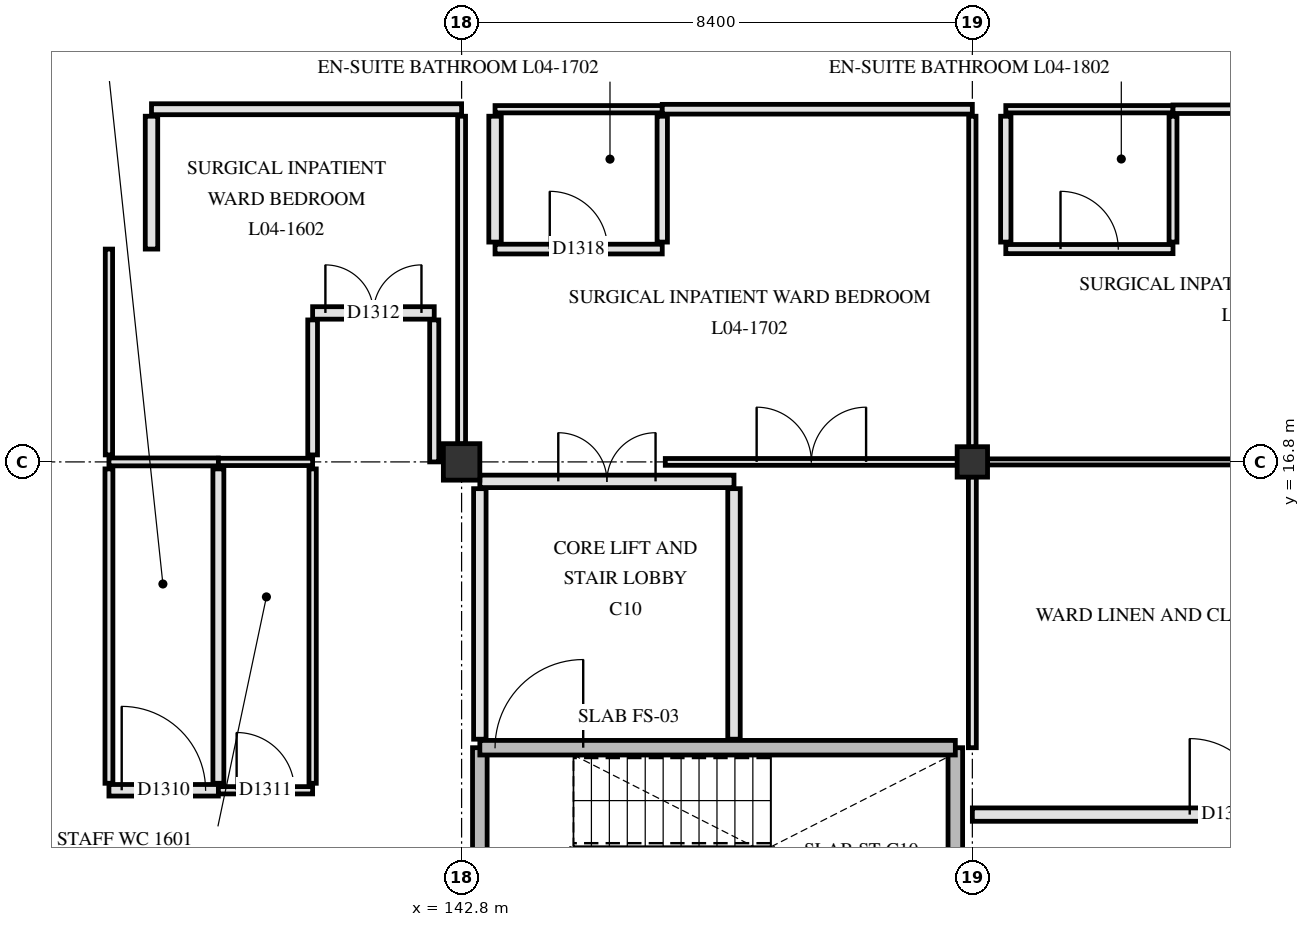
"""IFC4 building model, lengths in metres.
Left out: names, types, materials, properties, quantities, classifications, styles, units other than length and angle.
Written with IfcOpenShell. Run it as: python <this file> out.ifc"""

import sys

from ifc_helpers import new_model, si_unit, direction, frame, frame_2d, origin, origin_2d, place, context, subcontext, project, spatial, rectangle, extrude, element, fill, save


model = new_model("IFC4")
c1 = context("Model", 3, precision=1e-05, world=origin(), true_north=direction((0.0, 1.0)))
c2 = subcontext(c1, "Body", "Model", "MODEL_VIEW")
j1 = project(units=[si_unit("LENGTHUNIT", "METRE"), si_unit("PLANEANGLEUNIT", "RADIAN")], contexts=[c1])
p1 = place(None, origin())
s1 = spatial("IfcSite", under=j1, at=p1, CompositionType="ELEMENT")
p2 = place(p1, origin())
s2 = spatial("IfcBuilding", under=s1, at=p2, CompositionType="ELEMENT")
p3 = place(p2, frame((0.0, 0.0, 18.6)))
s3 = spatial("IfcBuildingStorey", under=s2, at=p3, CompositionType="ELEMENT", Elevation=18.6)
p4 = place(p3, frame((142.8, 16.8, 0.0), z_axis=(0.0, 0.0, 1.0), x_axis=(1.0, 0.0, 0.0)))
e1 = element("IfcColumn", 1, at=p4, inside=s3, PredefinedType="COLUMN", context=c2, shape_type="SweptSolid", body=[
    extrude(rectangle(XDim=0.6, YDim=0.6, at=origin_2d()), origin(), (0.0, 0.0, 1.0), 3.9),
])
p5 = place(p3, frame((151.2, 16.8, 0.0), z_axis=(0.0, 0.0, 1.0), x_axis=(1.0, 0.0, 0.0)))
e2 = element("IfcColumn", 2, at=p5, inside=s3, PredefinedType="COLUMN", context=c2, shape_type="SweptSolid", body=[
    extrude(rectangle(XDim=0.5, YDim=0.5, at=origin_2d()), origin(), (0.0, 0.0, 1.0), 3.9),
])
for number, where, z_axis, x_axis in (
    (3, (143.1, 8.78, 0.0), (0.0, 0.0, 1.0), (0.0, 1.0, 0.0)),
    (4, (150.92, 8.78, 0.0), (0.0, 0.0, 1.0), (0.0, 1.0, 0.0)),
):
    element("IfcWall", number, at=place(p3, frame(where, z_axis=z_axis, x_axis=x_axis)), inside=s3, PredefinedType="SHEAR", context=c2, shape_type="SweptSolid", body=[
        extrude(rectangle(XDim=3.32, YDim=0.24, at=frame_2d((1.66, 0.0))), origin(), (0.0, 0.0, 1.0), 3.62),
    ])
p6 = place(p3, frame((143.1, 12.1, 0.0), z_axis=(0.0, 0.0, 1.0), x_axis=(1.0, 0.0, 0.0)))
e5 = element("IfcWall", 5, at=p6, inside=s3, PredefinedType="SHEAR", context=c2, shape_type="SweptSolid", body=[
    extrude(rectangle(XDim=7.82, YDim=0.24, at=frame_2d((3.91, 0.0))), origin(), (0.0, 0.0, 1.0), 3.62),
])
p7 = place(p6, frame((0.25, 0.0, 0.0)))
e6 = element("IfcOpeningElement", 6, at=p7, cuts=e5, PredefinedType="OPENING", context=c2, shape_type="SweptSolid", body=[
    extrude(rectangle(XDim=1.45, YDim=2.2, at=frame_2d((0.725, 1.1))), frame((0.0, 0.13, 0.0), z_axis=(0.0, -1.0, 0.0), x_axis=(1.0, 0.0, 0.0)), (0.0, 0.0, 1.0), 0.26),
])
for number, where, z_axis, x_axis in (
    (7, (147.28, 12.24, 0.0), (0.0, 0.0, 1.0), (0.0, 1.0, 0.0)),
    (8, (143.1, 12.24, 0.0), (0.0, 0.0, 1.0), (0.0, 1.0, 0.0)),
):
    element("IfcWall", number, at=place(p3, frame(where, z_axis=z_axis, x_axis=x_axis)), inside=s3, PredefinedType="PARTITIONING", context=c2, shape_type="SweptSolid", body=[
        extrude(rectangle(XDim=4.12, YDim=0.205, at=frame_2d((2.06, 0.0))), origin(), (0.0, 0.0, 1.0), 3.61),
    ])
p8 = place(p3, frame((143.1, 16.48, 0.0), z_axis=(0.0, 0.0, 1.0), x_axis=(1.0, 0.0, 0.0)))
e9 = element("IfcWall", 9, at=p8, inside=s3, PredefinedType="PARTITIONING", context=c2, shape_type="SweptSolid", body=[
    extrude(rectangle(XDim=4.18, YDim=0.205, at=frame_2d((2.09, 0.0))), origin(), (0.0, 0.0, 1.0), 3.61),
])
p9 = place(p8, frame((1.29, 0.0, 0.0)))
e10 = element("IfcOpeningElement", 10, at=p9, cuts=e9, PredefinedType="OPENING", context=c2, shape_type="SweptSolid", body=[
    extrude(rectangle(XDim=1.6, YDim=2.25, at=frame_2d((0.8, 1.125))), frame((0.0, 0.113, 0.0), z_axis=(0.0, -1.0, 0.0), x_axis=(1.0, 0.0, 0.0)), (0.0, 0.0, 1.0), 0.225),
])
p10 = place(p3, frame((151.2, 11.0, 0.0), z_axis=(0.0, 0.0, 1.0), x_axis=(1.0, 0.0, 0.0)))
e11 = element("IfcWall", 11, at=p10, inside=s3, PredefinedType="PARTITIONING", context=c2, shape_type="SweptSolid", body=[
    extrude(rectangle(XDim=8.4, YDim=0.22, at=frame_2d((4.2, 0.0))), origin(), (0.0, 0.0, 1.0), 3.25),
])
p11 = place(p10, frame((3.575, 0.0, 0.0)))
e12 = element("IfcOpeningElement", 12, at=p11, cuts=e11, PredefinedType="OPENING", context=c2, shape_type="SweptSolid", body=[
    extrude(rectangle(XDim=1.25, YDim=2.2, at=frame_2d((0.625, 1.1))), frame((0.0, 0.12, 0.0), z_axis=(0.0, -1.0, 0.0), x_axis=(1.0, 0.0, 0.0)), (0.0, 0.0, 1.0), 0.24),
])
p12 = place(p3, frame((137.0, 11.4, 0.0), z_axis=(0.0, 0.0, 1.0), x_axis=(1.0, 0.0, 0.0)))
e13 = element("IfcWall", 13, at=p12, inside=s3, PredefinedType="PARTITIONING", context=c2, shape_type="SweptSolid", body=[
    extrude(rectangle(XDim=1.8, YDim=0.19, at=frame_2d((0.9, 0.0))), origin(), (0.0, 0.0, 1.0), 3.61),
])
p13 = place(p12, frame((0.21, 0.0, 0.0)))
e14 = element("IfcOpeningElement", 14, at=p13, cuts=e13, PredefinedType="OPENING", context=c2, shape_type="SweptSolid", body=[
    extrude(rectangle(XDim=1.38, YDim=2.22, at=frame_2d((0.69, 1.11))), frame((0.0, 0.105, 0.0), z_axis=(0.0, -1.0, 0.0), x_axis=(1.0, 0.0, 0.0)), (0.0, 0.0, 1.0), 0.21),
])
p14 = place(p3, frame((138.8, 11.4, 0.0), z_axis=(0.0, 0.0, 1.0), x_axis=(1.0, 0.0, 0.0)))
e15 = element("IfcWall", 15, at=p14, inside=s3, PredefinedType="PARTITIONING", context=c2, shape_type="SweptSolid", body=[
    extrude(rectangle(XDim=1.55, YDim=0.12, at=frame_2d((0.775, 0.0))), origin(), (0.0, 0.0, 1.0), 3.61),
])
p15 = place(p14, frame((0.3, 0.0, 0.0)))
e16 = element("IfcOpeningElement", 16, at=p15, cuts=e15, PredefinedType="OPENING", context=c2, shape_type="SweptSolid", body=[
    extrude(rectangle(XDim=0.95, YDim=2.1, at=frame_2d((0.475, 1.05))), frame((0.0, 0.07, 0.0), z_axis=(0.0, -1.0, 0.0), x_axis=(1.0, 0.0, 0.0)), (0.0, 0.0, 1.0), 0.14),
])
p16 = place(p3, frame((137.0, 16.8, 0.0), z_axis=(0.0, 0.0, 1.0), x_axis=(1.0, 0.0, 0.0)))
e17 = element("IfcWall", 17, at=p16, inside=s3, PredefinedType="PARTITIONING", context=c2, shape_type="SweptSolid", body=[
    extrude(rectangle(XDim=1.8, YDim=0.13, at=frame_2d((0.9, 0.0))), origin(), (0.0, 0.0, 1.0), 3.16),
])
p17 = place(p3, frame((138.8, 16.8, 0.0), z_axis=(0.0, 0.0, 1.0), x_axis=(1.0, 0.0, 0.0)))
e18 = element("IfcWall", 18, at=p17, inside=s3, PredefinedType="PARTITIONING", context=c2, shape_type="SweptSolid", body=[
    extrude(rectangle(XDim=1.55, YDim=0.12, at=frame_2d((0.775, 0.0))), origin(), (0.0, 0.0, 1.0), 3.16),
])
p18 = place(p3, frame((146.15, 16.8, 0.0), z_axis=(0.0, 0.0, 1.0), x_axis=(1.0, 0.0, 0.0)))
e19 = element("IfcWall", 19, at=p18, inside=s3, PredefinedType="PARTITIONING", context=c2, shape_type="SweptSolid", body=[
    extrude(rectangle(XDim=4.805, YDim=0.112, at=frame_2d((2.403, 0.0))), origin(), (0.0, 0.0, 1.0), 3.16),
])
p19 = place(p18, frame((1.502, 0.0, 0.0)))
e20 = element("IfcOpeningElement", 20, at=p19, cuts=e19, PredefinedType="OPENING", context=c2, shape_type="SweptSolid", body=[
    extrude(rectangle(XDim=1.8, YDim=2.25, at=frame_2d((0.9, 1.125))), frame((0.0, 0.066, 0.0), z_axis=(0.0, -1.0, 0.0), x_axis=(1.0, 0.0, 0.0)), (0.0, 0.0, 1.0), 0.132),
])
p20 = place(p3, frame((151.445, 16.8, 0.0), z_axis=(0.0, 0.0, 1.0), x_axis=(1.0, 0.0, 0.0)))
e21 = element("IfcWall", 21, at=p20, inside=s3, PredefinedType="PARTITIONING", context=c2, shape_type="SweptSolid", body=[
    extrude(rectangle(XDim=7.91, YDim=0.1, at=frame_2d((3.955, 0.0))), origin(), (0.0, 0.0, 1.0), 3.15),
])
p21 = place(p3, frame((140.35, 19.25, 0.0), z_axis=(0.0, 0.0, 1.0), x_axis=(1.0, 0.0, 0.0)))
e22 = element("IfcWall", 22, at=p21, inside=s3, PredefinedType="PARTITIONING", context=c2, shape_type="SweptSolid", body=[
    extrude(rectangle(XDim=2.0, YDim=0.205, at=frame_2d((1.0, 0.0))), origin(), (0.0, 0.0, 1.0), 3.61),
])
p22 = place(p21, frame((0.21, 0.0, 0.0)))
e23 = element("IfcOpeningElement", 23, at=p22, cuts=e22, PredefinedType="OPENING", context=c2, shape_type="SweptSolid", body=[
    extrude(rectangle(XDim=1.58, YDim=2.22, at=frame_2d((0.79, 1.11))), frame((0.0, 0.113, 0.0), z_axis=(0.0, -1.0, 0.0), x_axis=(1.0, 0.0, 0.0)), (0.0, 0.0, 1.0), 0.225),
])
p23 = place(p3, frame((143.35, 20.3, 0.0), z_axis=(0.0, 0.0, 1.0), x_axis=(1.0, 0.0, 0.0)))
e24 = element("IfcWall", 24, at=p23, inside=s3, PredefinedType="PARTITIONING", context=c2, shape_type="SweptSolid", body=[
    extrude(rectangle(XDim=2.75, YDim=0.16, at=frame_2d((1.375, 0.0))), origin(), (0.0, 0.0, 1.0), 3.61),
])
p24 = place(p23, frame((0.9, 0.0, 0.0)))
e25 = element("IfcOpeningElement", 25, at=p24, cuts=e24, PredefinedType="OPENING", context=c2, shape_type="SweptSolid", body=[
    extrude(rectangle(XDim=0.95, YDim=2.1, at=frame_2d((0.475, 1.05))), frame((0.0, 0.09, 0.0), z_axis=(0.0, -1.0, 0.0), x_axis=(1.0, 0.0, 0.0)), (0.0, 0.0, 1.0), 0.18),
])
p25 = place(p3, frame((151.75, 20.3, 0.0), z_axis=(0.0, 0.0, 1.0), x_axis=(1.0, 0.0, 0.0)))
e26 = element("IfcWall", 26, at=p25, inside=s3, PredefinedType="PARTITIONING", context=c2, shape_type="SweptSolid", body=[
    extrude(rectangle(XDim=2.75, YDim=0.15, at=frame_2d((1.375, 0.0))), origin(), (0.0, 0.0, 1.0), 3.61),
])
p26 = place(p25, frame((0.9, 0.0, 0.0)))
e27 = element("IfcOpeningElement", 27, at=p26, cuts=e26, PredefinedType="OPENING", context=c2, shape_type="SweptSolid", body=[
    extrude(rectangle(XDim=0.95, YDim=2.1, at=frame_2d((0.475, 1.05))), frame((0.0, 0.085, 0.0), z_axis=(0.0, -1.0, 0.0), x_axis=(1.0, 0.0, 0.0)), (0.0, 0.0, 1.0), 0.17),
])
p27 = place(p3, frame((137.7, 22.6, 0.0), z_axis=(0.0, 0.0, 1.0), x_axis=(1.0, 0.0, 0.0)))
e28 = element("IfcWall", 28, at=p27, inside=s3, PredefinedType="PARTITIONING", context=c2, shape_type="SweptSolid", body=[
    extrude(rectangle(XDim=5.1, YDim=0.18, at=frame_2d((2.55, 0.0))), origin(), (0.0, 0.0, 1.0), 3.26),
])
p28 = place(p3, frame((143.35, 22.6, 0.0), z_axis=(0.0, 0.0, 1.0), x_axis=(1.0, 0.0, 0.0)))
e29 = element("IfcWall", 29, at=p28, inside=s3, PredefinedType="PARTITIONING", context=c2, shape_type="SweptSolid", body=[
    extrude(rectangle(XDim=2.75, YDim=0.12, at=frame_2d((1.375, 0.0))), origin(), (0.0, 0.0, 1.0), 3.61),
])
p29 = place(p3, frame((146.1, 22.6, 0.0), z_axis=(0.0, 0.0, 1.0), x_axis=(1.0, 0.0, 0.0)))
e30 = element("IfcWall", 30, at=p29, inside=s3, PredefinedType="PARTITIONING", context=c2, shape_type="SweptSolid", body=[
    extrude(rectangle(XDim=5.1, YDim=0.16, at=frame_2d((2.55, 0.0))), origin(), (0.0, 0.0, 1.0), 3.25),
])
p30 = place(p3, frame((151.75, 22.6, 0.0), z_axis=(0.0, 0.0, 1.0), x_axis=(1.0, 0.0, 0.0)))
e31 = element("IfcWall", 31, at=p30, inside=s3, PredefinedType="PARTITIONING", context=c2, shape_type="SweptSolid", body=[
    extrude(rectangle(XDim=2.75, YDim=0.12, at=frame_2d((1.375, 0.0))), origin(), (0.0, 0.0, 1.0), 3.61),
])
p31 = place(p3, frame((154.5, 22.6, 0.0), z_axis=(0.0, 0.0, 1.0), x_axis=(1.0, 0.0, 0.0)))
e32 = element("IfcWall", 32, at=p31, inside=s3, PredefinedType="PARTITIONING", context=c2, shape_type="SweptSolid", body=[
    extrude(rectangle(XDim=5.1, YDim=0.14, at=frame_2d((2.55, 0.0))), origin(), (0.0, 0.0, 1.0), 3.25),
])
p32 = place(p31, frame((1.9, 0.0, 0.0)))
e33 = element("IfcOpeningElement", 33, at=p32, cuts=e32, PredefinedType="OPENING", context=c2, shape_type="SweptSolid", body=[
    extrude(rectangle(XDim=1.3, YDim=2.2, at=frame_2d((0.65, 1.1))), frame((0.0, 0.08, 0.0), z_axis=(0.0, -1.0, 0.0), x_axis=(1.0, 0.0, 0.0)), (0.0, 0.0, 1.0), 0.16),
])
p33 = place(p3, frame((137.0, 11.515, 0.0), z_axis=(0.0, 0.0, 1.0), x_axis=(0.0, 1.0, 0.0)))
e34 = element("IfcWall", 34, at=p33, inside=s3, PredefinedType="PARTITIONING", context=c2, shape_type="SweptSolid", body=[
    extrude(rectangle(XDim=5.17, YDim=0.13, at=frame_2d((2.585, 0.0))), origin(), (0.0, 0.0, 1.0), 3.31),
])
p34 = place(p3, frame((137.0, 16.915, 0.0), z_axis=(0.0, 0.0, 1.0), x_axis=(0.0, 1.0, 0.0)))
e35 = element("IfcWall", 35, at=p34, inside=s3, PredefinedType="PARTITIONING", context=c2, shape_type="SweptSolid", body=[
    extrude(rectangle(XDim=3.385, YDim=0.12, at=frame_2d((1.692, 0.0))), origin(), (0.0, 0.0, 1.0), 3.31),
])
p35 = place(p3, frame((137.7, 20.3, 0.0), z_axis=(0.0, 0.0, 1.0), x_axis=(0.0, 1.0, 0.0)))
e36 = element("IfcWall", 36, at=p35, inside=s3, PredefinedType="PARTITIONING", context=c2, shape_type="SweptSolid", body=[
    extrude(rectangle(XDim=2.185, YDim=0.205, at=frame_2d((1.093, 0.0))), origin(), (0.0, 0.0, 1.0), 3.31),
])
p36 = place(p3, frame((138.8, 11.515, 0.0), z_axis=(0.0, 0.0, 1.0), x_axis=(0.0, 1.0, 0.0)))
e37 = element("IfcWall", 37, at=p36, inside=s3, PredefinedType="PARTITIONING", context=c2, shape_type="SweptSolid", body=[
    extrude(rectangle(XDim=5.17, YDim=0.18, at=frame_2d((2.585, 0.0))), origin(), (0.0, 0.0, 1.0), 3.31),
])
p37 = place(p3, frame((140.35, 11.515, 0.0), z_axis=(0.0, 0.0, 1.0), x_axis=(0.0, 1.0, 0.0)))
e38 = element("IfcWall", 38, at=p37, inside=s3, PredefinedType="PARTITIONING", context=c2, shape_type="SweptSolid", body=[
    extrude(rectangle(XDim=5.17, YDim=0.12, at=frame_2d((2.585, 0.0))), origin(), (0.0, 0.0, 1.0), 3.31),
])
p38 = place(p3, frame((140.35, 16.915, 0.0), z_axis=(0.0, 0.0, 1.0), x_axis=(0.0, 1.0, 0.0)))
e39 = element("IfcWall", 39, at=p38, inside=s3, PredefinedType="PARTITIONING", context=c2, shape_type="SweptSolid", body=[
    extrude(rectangle(XDim=2.22, YDim=0.16, at=frame_2d((1.11, 0.0))), origin(), (0.0, 0.0, 1.0), 3.61),
])
p39 = place(p3, frame((142.35, 16.8, 0.0), z_axis=(0.0, 0.0, 1.0), x_axis=(0.0, 1.0, 0.0)))
e40 = element("IfcWall", 40, at=p39, inside=s3, PredefinedType="PARTITIONING", context=c2, shape_type="SweptSolid", body=[
    extrude(rectangle(XDim=2.335, YDim=0.15, at=frame_2d((1.167, 0.0))), origin(), (0.0, 0.0, 1.0), 3.16),
])
p40 = place(p3, frame((142.8, 17.095, 0.0), z_axis=(0.0, 0.0, 1.0), x_axis=(0.0, 1.0, 0.0)))
e41 = element("IfcWall", 41, at=p40, inside=s3, PredefinedType="PARTITIONING", context=c2, shape_type="SweptSolid", body=[
    extrude(rectangle(XDim=5.39, YDim=0.13, at=frame_2d((2.695, 0.0))), origin(), (0.0, 0.0, 1.0), 3.26),
])
p41 = place(p3, frame((143.35, 20.415, 0.0), z_axis=(0.0, 0.0, 1.0), x_axis=(0.0, 1.0, 0.0)))
e42 = element("IfcWall", 42, at=p41, inside=s3, PredefinedType="PARTITIONING", context=c2, shape_type="SweptSolid", body=[
    extrude(rectangle(XDim=2.07, YDim=0.205, at=frame_2d((1.035, 0.0))), origin(), (0.0, 0.0, 1.0), 3.31),
])
p42 = place(p3, frame((146.1, 20.415, 0.0), z_axis=(0.0, 0.0, 1.0), x_axis=(0.0, 1.0, 0.0)))
e43 = element("IfcWall", 43, at=p42, inside=s3, PredefinedType="PARTITIONING", context=c2, shape_type="SweptSolid", body=[
    extrude(rectangle(XDim=2.07, YDim=0.17, at=frame_2d((1.035, 0.0))), origin(), (0.0, 0.0, 1.0), 3.31),
])
p43 = place(p3, frame((151.2, 12.1, 0.0), z_axis=(0.0, 0.0, 1.0), x_axis=(0.0, 1.0, 0.0)))
e44 = element("IfcWall", 44, at=p43, inside=s3, PredefinedType="PARTITIONING", context=c2, shape_type="SweptSolid", body=[
    extrude(rectangle(XDim=4.455, YDim=0.13, at=frame_2d((2.228, 0.0))), origin(), (0.0, 0.0, 1.0), 3.25),
])
p44 = place(p3, frame((151.2, 17.045, 0.0), z_axis=(0.0, 0.0, 1.0), x_axis=(0.0, 1.0, 0.0)))
e45 = element("IfcWall", 45, at=p44, inside=s3, PredefinedType="PARTITIONING", context=c2, shape_type="SweptSolid", body=[
    extrude(rectangle(XDim=5.44, YDim=0.12, at=frame_2d((2.72, 0.0))), origin(), (0.0, 0.0, 1.0), 3.25),
])
p45 = place(p3, frame((151.75, 20.415, 0.0), z_axis=(0.0, 0.0, 1.0), x_axis=(0.0, 1.0, 0.0)))
e46 = element("IfcWall", 46, at=p45, inside=s3, PredefinedType="PARTITIONING", context=c2, shape_type="SweptSolid", body=[
    extrude(rectangle(XDim=2.07, YDim=0.17, at=frame_2d((1.035, 0.0))), origin(), (0.0, 0.0, 1.0), 3.3),
])
p46 = place(p3, frame((154.5, 20.415, 0.0), z_axis=(0.0, 0.0, 1.0), x_axis=(0.0, 1.0, 0.0)))
e47 = element("IfcWall", 47, at=p46, inside=s3, PredefinedType="PARTITIONING", context=c2, shape_type="SweptSolid", body=[
    extrude(rectangle(XDim=2.07, YDim=0.13, at=frame_2d((1.035, 0.0))), origin(), (0.0, 0.0, 1.0), 3.3),
])
p47 = place(p7, origin())
e48 = element("IfcDoor", 48, at=p47, inside=s3, OperationType="SINGLE_SWING_RIGHT", PredefinedType="DOOR", context=c2, shape_type="SweptSolid", body=[
    extrude(rectangle(XDim=1.45, YDim=2.2, at=frame_2d((0.725, 1.1))), frame((0.0, 0.025, 0.0), z_axis=(0.0, -1.0, 0.0), x_axis=(1.0, 0.0, 0.0)), (0.0, 0.0, 1.0), 0.05),
])
fill(e6, e48)
p48 = place(p9, origin())
e49 = element("IfcDoor", 49, at=p48, inside=s3, OperationType="DOUBLE_SWING_LEFT", PredefinedType="DOOR", context=c2, shape_type="SweptSolid", body=[
    extrude(rectangle(XDim=1.6, YDim=2.25, at=frame_2d((0.8, 1.125))), frame((0.0, 0.025, 0.0), z_axis=(0.0, -1.0, 0.0), x_axis=(1.0, 0.0, 0.0)), (0.0, 0.0, 1.0), 0.05),
])
fill(e10, e49)
p49 = place(p13, origin())
e50 = element("IfcDoor", 50, at=p49, inside=s3, OperationType="SINGLE_SWING_LEFT", PredefinedType="DOOR", context=c2, shape_type="SweptSolid", body=[
    extrude(rectangle(XDim=1.38, YDim=2.22, at=frame_2d((0.69, 1.11))), frame((0.0, 0.025, 0.0), z_axis=(0.0, -1.0, 0.0), x_axis=(1.0, 0.0, 0.0)), (0.0, 0.0, 1.0), 0.05),
])
fill(e14, e50)
p50 = place(p15, origin())
e51 = element("IfcDoor", 51, at=p50, inside=s3, OperationType="SINGLE_SWING_LEFT", PredefinedType="DOOR", context=c2, shape_type="SweptSolid", body=[
    extrude(rectangle(XDim=0.95, YDim=2.1, at=frame_2d((0.475, 1.05))), frame((0.0, 0.025, 0.0), z_axis=(0.0, -1.0, 0.0), x_axis=(1.0, 0.0, 0.0)), (0.0, 0.0, 1.0), 0.05),
])
fill(e16, e51)
p51 = place(p22, origin())
e52 = element("IfcDoor", 52, at=p51, inside=s3, OperationType="DOUBLE_SWING_LEFT", PredefinedType="DOOR", context=c2, shape_type="SweptSolid", body=[
    extrude(rectangle(XDim=1.58, YDim=2.22, at=frame_2d((0.79, 1.11))), frame((0.0, 0.025, 0.0), z_axis=(0.0, -1.0, 0.0), x_axis=(1.0, 0.0, 0.0)), (0.0, 0.0, 1.0), 0.05),
])
fill(e23, e52)
p52 = place(p19, origin())
e53 = element("IfcDoor", 53, at=p52, inside=s3, OperationType="DOUBLE_SWING_RIGHT", PredefinedType="DOOR", context=c2, shape_type="SweptSolid", body=[
    extrude(rectangle(XDim=1.8, YDim=2.25, at=frame_2d((0.9, 1.125))), frame((0.0, 0.025, 0.0), z_axis=(0.0, -1.0, 0.0), x_axis=(1.0, 0.0, 0.0)), (0.0, 0.0, 1.0), 0.05),
])
fill(e20, e53)
p53 = place(p24, origin())
e54 = element("IfcDoor", 54, at=p53, inside=s3, OperationType="SINGLE_SWING_LEFT", PredefinedType="DOOR", context=c2, shape_type="SweptSolid", body=[
    extrude(rectangle(XDim=0.95, YDim=2.1, at=frame_2d((0.475, 1.05))), frame((0.0, 0.025, 0.0), z_axis=(0.0, -1.0, 0.0), x_axis=(1.0, 0.0, 0.0)), (0.0, 0.0, 1.0), 0.05),
])
fill(e25, e54)
p54 = place(p11, origin())
e55 = element("IfcDoor", 55, at=p54, inside=s3, OperationType="SINGLE_SWING_LEFT", PredefinedType="DOOR", context=c2, shape_type="SweptSolid", body=[
    extrude(rectangle(XDim=1.25, YDim=2.2, at=frame_2d((0.625, 1.1))), frame((0.0, 0.025, 0.0), z_axis=(0.0, -1.0, 0.0), x_axis=(1.0, 0.0, 0.0)), (0.0, 0.0, 1.0), 0.05),
])
fill(e12, e55)
p55 = place(p26, origin())
e56 = element("IfcDoor", 56, at=p55, inside=s3, OperationType="SINGLE_SWING_LEFT", PredefinedType="DOOR", context=c2, shape_type="SweptSolid", body=[
    extrude(rectangle(XDim=0.95, YDim=2.1, at=frame_2d((0.475, 1.05))), frame((0.0, 0.025, 0.0), z_axis=(0.0, -1.0, 0.0), x_axis=(1.0, 0.0, 0.0)), (0.0, 0.0, 1.0), 0.05),
])
fill(e27, e56)
save(model, sys.argv[1])
